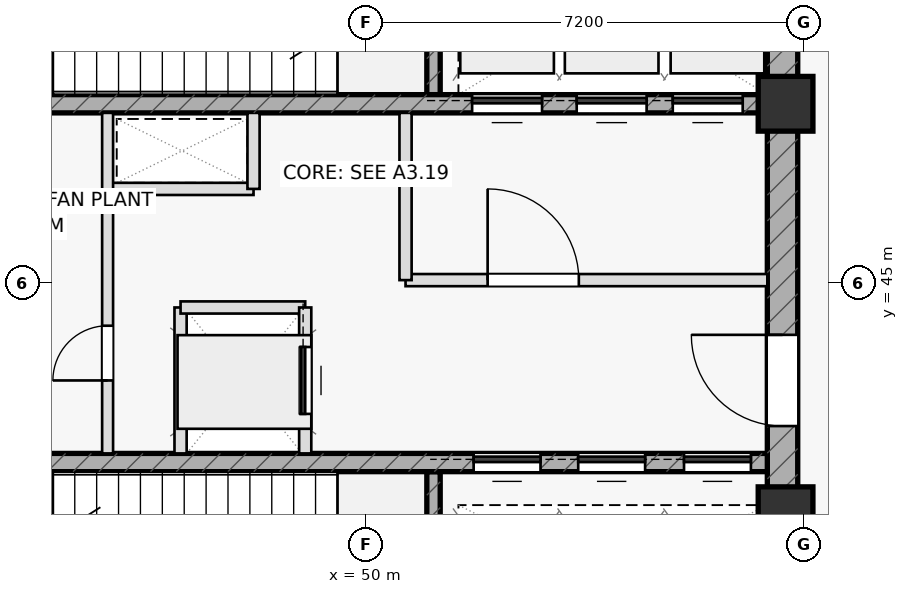
"""IFC4 building model, lengths in metres.
Left out: names, types, materials, properties, quantities, classifications, styles, units other than length and angle.
Written with IfcOpenShell. Run it as: python <this file> out.ifc"""

import sys

from ifc_helpers import new_model, si_unit, direction, frame, frame_2d, origin, origin_2d, place, context, subcontext, project, spatial, rectangle, extrude, element, fill, save


model = new_model("IFC4")
c1 = context("Model", 3, precision=1e-05, world=origin(), true_north=direction((0.0, 1.0)))
c2 = subcontext(c1, "Body", "Model", "MODEL_VIEW")
j1 = project(units=[si_unit("LENGTHUNIT", "METRE"), si_unit("PLANEANGLEUNIT", "RADIAN")], contexts=[c1])
p1 = place(None, origin())
s1 = spatial("IfcSite", under=j1, at=p1, CompositionType="ELEMENT")
p2 = place(p1, origin())
s2 = spatial("IfcBuilding", under=s1, at=p2, CompositionType="ELEMENT")
p3 = place(p2, frame((0.0, 0.0, 204.15)))
s3 = spatial("IfcBuildingStorey", under=s2, at=p3, CompositionType="ELEMENT", Elevation=204.15)
for number, where, z_axis, x_axis in (
    (1, (51.11, 48.1, 0.0), (0.0, 0.0, 1.0), (0.0, 1.0, 0.0)),
    (2, (51.11, 38.8, 0.0), (0.0, 0.0, 1.0), (0.0, 1.0, 0.0)),
):
    element("IfcWall", number, at=place(p3, frame(where, z_axis=z_axis, x_axis=x_axis)), inside=s3, PredefinedType="SHEAR", context=c2, shape_type="SweptSolid", body=[
        extrude(rectangle(XDim=3.1, YDim=0.22, at=frame_2d((1.55, 0.0))), origin(), (0.0, 0.0, 1.0), 4.55),
    ])
p4 = place(p3, frame((56.85, 38.8, 0.0), z_axis=(0.0, 0.0, 1.0), x_axis=(0.0, 1.0, 0.0)))
e3 = element("IfcWall", 3, at=p4, inside=s3, PredefinedType="SHEAR", context=c2, shape_type="SweptSolid", body=[
    extrude(rectangle(XDim=12.4, YDim=0.5, at=frame_2d((6.2, 0.0))), origin(), (0.0, 0.0, 1.0), 4.55),
])
p5 = place(p4, frame((3.85, 0.0, 0.0)))
e4 = element("IfcOpeningElement", 4, at=p5, cuts=e3, PredefinedType="OPENING", context=c2, shape_type="SweptSolid", body=[
    extrude(rectangle(XDim=1.5, YDim=2.2, at=frame_2d((0.75, 1.1))), frame((0.0, 0.26, 0.0), z_axis=(0.0, -1.0, 0.0), x_axis=(1.0, 0.0, 0.0)), (0.0, 0.0, 1.0), 0.52),
])
p6 = place(p3, frame((43.4, 47.95, 0.0), z_axis=(0.0, 0.0, 1.0), x_axis=(1.0, 0.0, 0.0)))
e5 = element("IfcWall", 5, at=p6, inside=s3, PredefinedType="SHEAR", context=c2, shape_type="SweptSolid", body=[
    extrude(rectangle(XDim=13.2, YDim=0.3, at=frame_2d((6.6, 0.0))), origin(), (0.0, 0.0, 1.0), 4.55),
])
p7 = place(p6, frame((8.345, 0.0, 0.0)))
e6 = element("IfcOpeningElement", 6, at=p7, cuts=e5, PredefinedType="OPENING", context=c2, shape_type="SweptSolid", body=[
    extrude(rectangle(XDim=1.15, YDim=2.2, at=frame_2d((0.575, 1.1))), frame((0.0, 0.16, 0.0), z_axis=(0.0, -1.0, 0.0), x_axis=(1.0, 0.0, 0.0)), (0.0, 0.0, 1.0), 0.32),
])
p8 = place(p6, frame((10.065, 0.0, 0.0)))
e7 = element("IfcOpeningElement", 7, at=p8, cuts=e5, PredefinedType="OPENING", context=c2, shape_type="SweptSolid", body=[
    extrude(rectangle(XDim=1.15, YDim=2.2, at=frame_2d((0.575, 1.1))), frame((0.0, 0.16, 0.0), z_axis=(0.0, -1.0, 0.0), x_axis=(1.0, 0.0, 0.0)), (0.0, 0.0, 1.0), 0.32),
])
p9 = place(p6, frame((11.645, 0.0, 0.0)))
e8 = element("IfcOpeningElement", 8, at=p9, cuts=e5, PredefinedType="OPENING", context=c2, shape_type="SweptSolid", body=[
    extrude(rectangle(XDim=1.15, YDim=2.2, at=frame_2d((0.575, 1.1))), frame((0.0, 0.16, 0.0), z_axis=(0.0, -1.0, 0.0), x_axis=(1.0, 0.0, 0.0)), (0.0, 0.0, 1.0), 0.32),
])
p10 = place(p3, frame((43.4, 42.05, 0.0), z_axis=(0.0, 0.0, 1.0), x_axis=(1.0, 0.0, 0.0)))
e9 = element("IfcWall", 9, at=p10, inside=s3, PredefinedType="SHEAR", context=c2, shape_type="SweptSolid", body=[
    extrude(rectangle(XDim=13.2, YDim=0.3, at=frame_2d((6.6, 0.0))), origin(), (0.0, 0.0, 1.0), 4.55),
])
p11 = place(p10, frame((8.37, 0.0, 0.0)))
e10 = element("IfcOpeningElement", 10, at=p11, cuts=e9, PredefinedType="OPENING", context=c2, shape_type="SweptSolid", body=[
    extrude(rectangle(XDim=1.1, YDim=2.15, at=frame_2d((0.55, 1.075))), frame((0.0, 0.16, 0.0), z_axis=(0.0, -1.0, 0.0), x_axis=(1.0, 0.0, 0.0)), (0.0, 0.0, 1.0), 0.32),
])
p12 = place(p10, frame((10.09, 0.0, 0.0)))
e11 = element("IfcOpeningElement", 11, at=p12, cuts=e9, PredefinedType="OPENING", context=c2, shape_type="SweptSolid", body=[
    extrude(rectangle(XDim=1.1, YDim=2.15, at=frame_2d((0.55, 1.075))), frame((0.0, 0.16, 0.0), z_axis=(0.0, -1.0, 0.0), x_axis=(1.0, 0.0, 0.0)), (0.0, 0.0, 1.0), 0.32),
])
p13 = place(p10, frame((11.83, 0.0, 0.0)))
e12 = element("IfcOpeningElement", 12, at=p13, cuts=e9, PredefinedType="OPENING", context=c2, shape_type="SweptSolid", body=[
    extrude(rectangle(XDim=1.1, YDim=2.15, at=frame_2d((0.55, 1.075))), frame((0.0, 0.16, 0.0), z_axis=(0.0, -1.0, 0.0), x_axis=(1.0, 0.0, 0.0)), (0.0, 0.0, 1.0), 0.32),
])
for number, where, z_axis, x_axis in (
    (13, (56.9, 47.95, 0.0), (0.0, 0.0, 1.0), (1.0, 0.0, 0.0)),
    (14, (56.9, 41.2, 0.0), (0.0, 0.0, 1.0), (1.0, 0.0, 0.0)),
):
    element("IfcColumn", number, at=place(p3, frame(where, z_axis=z_axis, x_axis=x_axis)), inside=s3, PredefinedType="COLUMN", context=c2, shape_type="SweptSolid", body=[
        extrude(rectangle(XDim=0.9, YDim=0.9, at=origin_2d()), origin(), (0.0, 0.0, 1.0), 4.55),
    ])
p14 = place(p3, frame((45.75, 46.55, 0.0), z_axis=(0.0, 0.0, 1.0), x_axis=(1.0, 0.0, 0.0)))
e15 = element("IfcWall", 15, at=p14, inside=s3, PredefinedType="PARTITIONING", context=c2, shape_type="SweptSolid", body=[
    extrude(rectangle(XDim=2.4, YDim=0.2, at=frame_2d((1.2, 0.0))), origin(), (0.0, 0.0, 1.0), 4.55),
])
p15 = place(p3, frame((48.15, 46.55, 0.0), z_axis=(0.0, 0.0, 1.0), x_axis=(0.0, 1.0, 0.0)))
e16 = element("IfcWall", 16, at=p15, inside=s3, PredefinedType="PARTITIONING", context=c2, shape_type="SweptSolid", body=[
    extrude(rectangle(XDim=1.25, YDim=0.2, at=frame_2d((0.625, 0.0))), origin(), (0.0, 0.0, 1.0), 4.55),
])
p16 = place(p3, frame((46.95, 42.2, 0.0), z_axis=(0.0, 0.0, 1.0), x_axis=(0.0, 1.0, 0.0)))
e17 = element("IfcWall", 17, at=p16, inside=s3, PredefinedType="PARTITIONING", context=c2, shape_type="SweptSolid", body=[
    extrude(rectangle(XDim=2.4, YDim=0.2, at=frame_2d((1.2, 0.0))), origin(), (0.0, 0.0, 1.0), 4.55),
])
p17 = place(p3, frame((46.95, 44.6, 0.0), z_axis=(0.0, 0.0, 1.0), x_axis=(1.0, 0.0, 0.0)))
e18 = element("IfcWall", 18, at=p17, inside=s3, PredefinedType="PARTITIONING", context=c2, shape_type="SweptSolid", body=[
    extrude(rectangle(XDim=2.05, YDim=0.2, at=frame_2d((1.025, 0.0))), origin(), (0.0, 0.0, 1.0), 4.55),
])
p18 = place(p3, frame((50.65, 45.05, 0.0), z_axis=(0.0, 0.0, 1.0), x_axis=(1.0, 0.0, 0.0)))
e19 = element("IfcWall", 19, at=p18, inside=s3, PredefinedType="PARTITIONING", context=c2, shape_type="SweptSolid", body=[
    extrude(rectangle(XDim=5.95, YDim=0.2, at=frame_2d((2.975, 0.0))), origin(), (0.0, 0.0, 1.0), 4.55),
])
p19 = place(p18, frame((1.35, 0.0, 0.0)))
e20 = element("IfcOpeningElement", 20, at=p19, cuts=e19, PredefinedType="OPENING", context=c2, shape_type="SweptSolid", body=[
    extrude(rectangle(XDim=1.5, YDim=2.2, at=frame_2d((0.75, 1.1))), frame((0.0, 0.11, 0.0), z_axis=(0.0, -1.0, 0.0), x_axis=(1.0, 0.0, 0.0)), (0.0, 0.0, 1.0), 0.22),
])
p20 = place(p3, frame((50.65, 45.05, 0.0), z_axis=(0.0, 0.0, 1.0), x_axis=(0.0, 1.0, 0.0)))
e21 = element("IfcWall", 21, at=p20, inside=s3, PredefinedType="PARTITIONING", context=c2, shape_type="SweptSolid", body=[
    extrude(rectangle(XDim=2.75, YDim=0.2, at=frame_2d((1.375, 0.0))), origin(), (0.0, 0.0, 1.0), 4.55),
])
p21 = place(p3, frame((45.75, 42.2, 0.0), z_axis=(0.0, 0.0, 1.0), x_axis=(0.0, 1.0, 0.0)))
e22 = element("IfcWall", 22, at=p21, inside=s3, PredefinedType="PARTITIONING", context=c2, shape_type="SweptSolid", body=[
    extrude(rectangle(XDim=5.6, YDim=0.18, at=frame_2d((2.8, 0.0))), origin(), (0.0, 0.0, 1.0), 4.55),
])
p22 = place(p21, frame((1.2, 0.0, 0.0)))
e23 = element("IfcOpeningElement", 23, at=p22, cuts=e22, PredefinedType="OPENING", context=c2, shape_type="SweptSolid", body=[
    extrude(rectangle(XDim=0.9, YDim=2.05, at=frame_2d((0.45, 1.025))), frame((0.0, 0.1, 0.0), z_axis=(0.0, -1.0, 0.0), x_axis=(1.0, 0.0, 0.0)), (0.0, 0.0, 1.0), 0.2),
])
p23 = place(p3, frame((49.0, 42.2, 0.0), z_axis=(0.0, 0.0, 1.0), x_axis=(0.0, 1.0, 0.0)))
e24 = element("IfcWall", 24, at=p23, inside=s3, PredefinedType="PARTITIONING", context=c2, shape_type="SweptSolid", body=[
    extrude(rectangle(XDim=2.4, YDim=0.2, at=frame_2d((1.2, 0.0))), origin(), (0.0, 0.0, 1.0), 4.55),
])
p24 = place(p23, frame((0.65, 0.0, 0.0)))
e25 = element("IfcOpeningElement", 25, at=p24, cuts=e24, PredefinedType="OPENING", context=c2, shape_type="SweptSolid", body=[
    extrude(rectangle(XDim=1.1, YDim=2.15, at=frame_2d((0.55, 1.075))), frame((0.0, 0.11, 0.0), z_axis=(0.0, -1.0, 0.0), x_axis=(1.0, 0.0, 0.0)), (0.0, 0.0, 1.0), 0.22),
])
p25 = place(p5, origin())
e26 = element("IfcDoor", 26, at=p25, inside=s3, OperationType="SINGLE_SWING_RIGHT", PredefinedType="DOOR", context=c2, shape_type="SweptSolid", body=[
    extrude(rectangle(XDim=1.5, YDim=2.2, at=frame_2d((0.75, 1.1))), frame((0.0, 0.025, 0.0), z_axis=(0.0, -1.0, 0.0), x_axis=(1.0, 0.0, 0.0)), (0.0, 0.0, 1.0), 0.05),
])
fill(e4, e26)
p26 = place(p19, origin())
e27 = element("IfcDoor", 27, at=p26, inside=s3, OperationType="SINGLE_SWING_LEFT", PredefinedType="DOOR", context=c2, shape_type="SweptSolid", body=[
    extrude(rectangle(XDim=1.5, YDim=2.2, at=frame_2d((0.75, 1.1))), frame((0.0, 0.025, 0.0), z_axis=(0.0, -1.0, 0.0), x_axis=(1.0, 0.0, 0.0)), (0.0, 0.0, 1.0), 0.05),
])
fill(e20, e27)
p27 = place(p22, origin())
e28 = element("IfcDoor", 28, at=p27, inside=s3, OperationType="SINGLE_SWING_LEFT", PredefinedType="DOOR", context=c2, shape_type="SweptSolid", body=[
    extrude(rectangle(XDim=0.9, YDim=2.05, at=frame_2d((0.45, 1.025))), frame((0.0, 0.025, 0.0), z_axis=(0.0, -1.0, 0.0), x_axis=(1.0, 0.0, 0.0)), (0.0, 0.0, 1.0), 0.05),
])
fill(e23, e28)
p28 = place(p7, origin())
e29 = element("IfcDoor", 29, at=p28, inside=s3, OperationType="SLIDING_TO_LEFT", PredefinedType="DOOR", context=c2, shape_type="SweptSolid", body=[
    extrude(rectangle(XDim=1.15, YDim=2.2, at=frame_2d((0.575, 1.1))), frame((0.0, 0.025, 0.0), z_axis=(0.0, -1.0, 0.0), x_axis=(1.0, 0.0, 0.0)), (0.0, 0.0, 1.0), 0.05),
])
fill(e6, e29)
p29 = place(p8, origin())
e30 = element("IfcDoor", 30, at=p29, inside=s3, OperationType="SLIDING_TO_LEFT", PredefinedType="DOOR", context=c2, shape_type="SweptSolid", body=[
    extrude(rectangle(XDim=1.15, YDim=2.2, at=frame_2d((0.575, 1.1))), frame((0.0, 0.025, 0.0), z_axis=(0.0, -1.0, 0.0), x_axis=(1.0, 0.0, 0.0)), (0.0, 0.0, 1.0), 0.05),
])
fill(e7, e30)
p30 = place(p9, origin())
e31 = element("IfcDoor", 31, at=p30, inside=s3, OperationType="SLIDING_TO_LEFT", PredefinedType="DOOR", context=c2, shape_type="SweptSolid", body=[
    extrude(rectangle(XDim=1.15, YDim=2.2, at=frame_2d((0.575, 1.1))), frame((0.0, 0.025, 0.0), z_axis=(0.0, -1.0, 0.0), x_axis=(1.0, 0.0, 0.0)), (0.0, 0.0, 1.0), 0.05),
])
fill(e8, e31)
p31 = place(p11, origin())
e32 = element("IfcDoor", 32, at=p31, inside=s3, OperationType="SLIDING_TO_LEFT", PredefinedType="DOOR", context=c2, shape_type="SweptSolid", body=[
    extrude(rectangle(XDim=1.1, YDim=2.15, at=frame_2d((0.55, 1.075))), frame((0.0, 0.025, 0.0), z_axis=(0.0, -1.0, 0.0), x_axis=(1.0, 0.0, 0.0)), (0.0, 0.0, 1.0), 0.05),
])
fill(e10, e32)
p32 = place(p12, origin())
e33 = element("IfcDoor", 33, at=p32, inside=s3, OperationType="SLIDING_TO_LEFT", PredefinedType="DOOR", context=c2, shape_type="SweptSolid", body=[
    extrude(rectangle(XDim=1.1, YDim=2.15, at=frame_2d((0.55, 1.075))), frame((0.0, 0.025, 0.0), z_axis=(0.0, -1.0, 0.0), x_axis=(1.0, 0.0, 0.0)), (0.0, 0.0, 1.0), 0.05),
])
fill(e11, e33)
p33 = place(p13, origin())
e34 = element("IfcDoor", 34, at=p33, inside=s3, OperationType="SLIDING_TO_LEFT", PredefinedType="DOOR", context=c2, shape_type="SweptSolid", body=[
    extrude(rectangle(XDim=1.1, YDim=2.15, at=frame_2d((0.55, 1.075))), frame((0.0, 0.025, 0.0), z_axis=(0.0, -1.0, 0.0), x_axis=(1.0, 0.0, 0.0)), (0.0, 0.0, 1.0), 0.05),
])
fill(e12, e34)
p34 = place(p24, origin())
e35 = element("IfcDoor", 35, at=p34, inside=s3, OperationType="SLIDING_TO_RIGHT", PredefinedType="DOOR", context=c2, shape_type="SweptSolid", body=[
    extrude(rectangle(XDim=1.1, YDim=2.15, at=frame_2d((0.55, 1.075))), frame((0.0, 0.025, 0.0), z_axis=(0.0, -1.0, 0.0), x_axis=(1.0, 0.0, 0.0)), (0.0, 0.0, 1.0), 0.05),
])
fill(e25, e35)
save(model, sys.argv[1])
